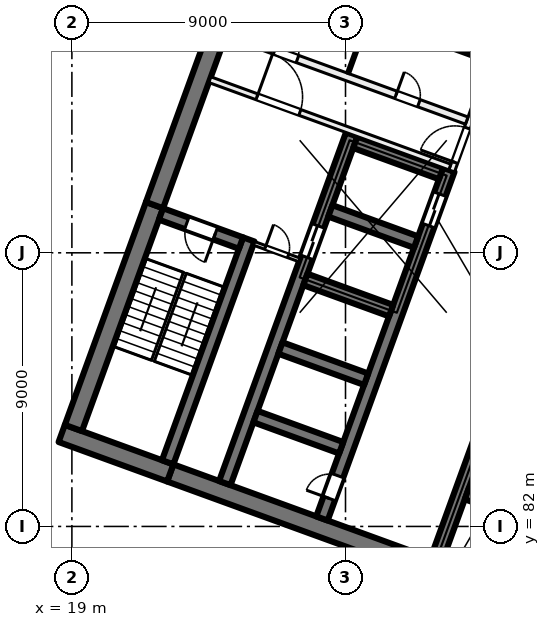
"""IFC4 building model, lengths in metres.
Left out: names, types, materials, properties, quantities, classifications, styles, units other than length and angle.
Written with IfcOpenShell. Run it as: python <this file> out.ifc"""

import sys

from ifc_helpers import new_model, si_unit, direction, frame, frame_2d, origin, place, context, subcontext, project, spatial, rectangle, extrude, element, fill, save


model = new_model("IFC4")
c1 = context("Model", 3, precision=1e-05, world=origin(), true_north=direction((0.0, 1.0)))
c2 = subcontext(c1, "Body", "Model", "MODEL_VIEW")
j1 = project(units=[si_unit("LENGTHUNIT", "METRE"), si_unit("PLANEANGLEUNIT", "RADIAN")], contexts=[c1])
p1 = place(None, origin())
s1 = spatial("IfcSite", under=j1, at=p1, CompositionType="ELEMENT")
p2 = place(p1, origin())
s2 = spatial("IfcBuilding", under=s1, at=p2, CompositionType="ELEMENT")
p3 = place(p2, frame((0.0, 0.0, 39.5)))
s3 = spatial("IfcBuildingStorey", under=s2, at=p3, CompositionType="ELEMENT", Elevation=39.5)
p4 = place(p3, frame((35.767, 78.835, 0.0), z_axis=(0.0, 0.0, 1.0), x_axis=(-0.939692894512, 0.342019391267, 0.0)))
e1 = element("IfcWall", 1, at=p4, inside=s3, PredefinedType="SHEAR", context=c2, shape_type="SweptSolid", body=[
    extrude(rectangle(XDim=14.4, YDim=0.6, at=frame_2d((7.2, 0.0))), origin(), (0.0, 0.0, 1.0), 4.0),
])
p5 = place(p3, frame((22.236, 83.76, 0.0), z_axis=(0.0, 0.0, 1.0), x_axis=(-0.939680822529, 0.342052557032, 0.0)))
e2 = element("IfcWall", 2, at=p5, inside=s3, PredefinedType="SHEAR", context=c2, shape_type="SweptSolid", body=[
    extrude(rectangle(XDim=3.8, YDim=0.6, at=frame_2d((1.9, 0.0))), origin(), (0.0, 0.0, 1.0), 4.0),
])
p6 = place(p3, frame((19.05, 85.239, 0.0), z_axis=(0.0, 0.0, 1.0), x_axis=(0.342016982193, 0.939693771338, 0.0)))
e3 = element("IfcWall", 3, at=p6, inside=s3, PredefinedType="SHEAR", context=c2, shape_type="SweptSolid", body=[
    extrude(rectangle(XDim=7.8, YDim=0.6, at=frame_2d((3.9, 0.0))), origin(), (0.0, 0.0, 1.0), 4.0),
])
p7 = place(p3, frame((21.717, 92.568, 0.0), z_axis=(0.0, 0.0, 1.0), x_axis=(0.342016162452, 0.939694069696, 0.0)))
e4 = element("IfcWall", 4, at=p7, inside=s3, PredefinedType="SHEAR", context=c2, shape_type="SweptSolid", body=[
    extrude(rectangle(XDim=8.9, YDim=0.6, at=frame_2d((4.45, 0.0))), origin(), (0.0, 0.0, 1.0), 4.0),
])
p8 = place(p3, frame((22.15, 84.11, 0.0), z_axis=(0.0, 0.0, 1.0), x_axis=(0.342016982193, 0.939693771338, 0.0)))
e5 = element("IfcWall", 5, at=p8, inside=s3, PredefinedType="SHEAR", context=c2, shape_type="SweptSolid", body=[
    extrude(rectangle(XDim=7.8, YDim=0.4, at=frame_2d((3.9, 0.0))), origin(), (0.0, 0.0, 1.0), 4.0),
])
p9 = place(p3, frame((24.562, 91.32, 0.0), z_axis=(0.0, 0.0, 1.0), x_axis=(-0.939717030584, 0.341953070509, 0.0)))
e6 = element("IfcWall", 6, at=p9, inside=s3, PredefinedType="SHEAR", context=c2, shape_type="SweptSolid", body=[
    extrude(rectangle(XDim=2.8, YDim=0.4, at=frame_2d((1.4, 0.0))), origin(), (0.0, 0.0, 1.0), 4.0),
])
p10 = place(p9, frame((0.9, 0.0, 0.0)))
e7 = element("IfcOpeningElement", 7, at=p10, cuts=e6, PredefinedType="OPENING", context=c2, shape_type="SweptSolid", body=[
    extrude(rectangle(XDim=1.0, YDim=2.1, at=frame_2d((0.5, 1.05))), frame((0.0, 0.21, 0.0), z_axis=(0.0, -1.0, 0.0), x_axis=(1.0, 0.0, 0.0)), (0.0, 0.0, 1.0), 0.42),
])
p11 = place(p3, frame((30.984, 80.895, 0.0), z_axis=(0.0, 0.0, 1.0), x_axis=(0.342021021735, 0.939692301071, 0.0)))
e8 = element("IfcWall", 8, at=p11, inside=s3, PredefinedType="SHEAR", context=c2, shape_type="SweptSolid", body=[
    extrude(rectangle(XDim=12.2, YDim=0.4, at=frame_2d((6.1, 0.0))), origin(), (0.0, 0.0, 1.0), 4.0),
])
p12 = place(p11, frame((5.45, 0.0, 0.0)))
e9 = element("IfcOpeningElement", 9, at=p12, cuts=e8, PredefinedType="OPENING", context=c2, shape_type="SweptSolid", body=[
    extrude(rectangle(XDim=1.1, YDim=2.1, at=frame_2d((0.55, 1.05))), frame((0.0, 0.21, 0.0), z_axis=(0.0, -1.0, 0.0), x_axis=(1.0, 0.0, 0.0)), (0.0, 0.0, 1.0), 0.42),
])
p13 = place(p11, frame((7.85, 0.0, 0.0)))
e10 = element("IfcOpeningElement", 10, at=p13, cuts=e8, PredefinedType="OPENING", context=c2, shape_type="SweptSolid", body=[
    extrude(rectangle(XDim=1.1, YDim=2.1, at=frame_2d((0.55, 1.05))), frame((0.0, 0.21, 0.0), z_axis=(0.0, -1.0, 0.0), x_axis=(1.0, 0.0, 0.0)), (0.0, 0.0, 1.0), 0.42),
])
p14 = place(p11, frame((10.25, 0.0, 0.0)))
e11 = element("IfcOpeningElement", 11, at=p14, cuts=e8, PredefinedType="OPENING", context=c2, shape_type="SweptSolid", body=[
    extrude(rectangle(XDim=1.1, YDim=2.1, at=frame_2d((0.55, 1.05))), frame((0.0, 0.21, 0.0), z_axis=(0.0, -1.0, 0.0), x_axis=(1.0, 0.0, 0.0)), (0.0, 0.0, 1.0), 0.42),
])
p15 = place(p3, frame((34.812, 82.056, 0.0), z_axis=(0.0, 0.0, 1.0), x_axis=(-0.939686455819, 0.342037080957, 0.0)))
e12 = element("IfcWall", 12, at=p15, inside=s3, PredefinedType="SHEAR", context=c2, shape_type="SweptSolid", body=[
    extrude(rectangle(XDim=3.0, YDim=0.4, at=frame_2d((1.5, 0.0))), origin(), (0.0, 0.0, 1.0), 4.0),
])
p16 = place(p3, frame((27.225, 82.263, 0.0), z_axis=(0.0, 0.0, 1.0), x_axis=(0.342014590177, 0.939694641948, 0.0)))
e13 = element("IfcWall", 13, at=p16, inside=s3, PredefinedType="SHEAR", context=c2, shape_type="SweptSolid", body=[
    extrude(rectangle(XDim=12.2, YDim=0.4, at=frame_2d((6.1, 0.0))), origin(), (0.0, 0.0, 1.0), 4.0),
])
p17 = place(p16, frame((10.25, 0.0, 0.0)))
e14 = element("IfcOpeningElement", 14, at=p17, cuts=e13, PredefinedType="OPENING", context=c2, shape_type="SweptSolid", body=[
    extrude(rectangle(XDim=1.1, YDim=2.1, at=frame_2d((0.55, 1.05))), frame((0.0, 0.21, 0.0), z_axis=(0.0, -1.0, 0.0), x_axis=(1.0, 0.0, 0.0)), (0.0, 0.0, 1.0), 0.42),
])
p18 = place(p16, frame((0.7, 0.0, 0.0)))
e15 = element("IfcOpeningElement", 15, at=p18, cuts=e13, PredefinedType="OPENING", context=c2, shape_type="SweptSolid", body=[
    extrude(rectangle(XDim=0.8, YDim=2.1, at=frame_2d((0.4, 1.05))), frame((0.0, 0.21, 0.0), z_axis=(0.0, -1.0, 0.0), x_axis=(1.0, 0.0, 0.0)), (0.0, 0.0, 1.0), 0.42),
])
p19 = place(p3, frame((24.03, 83.426, 0.0), z_axis=(0.0, 0.0, 1.0), x_axis=(0.342014590177, 0.939694641948, 0.0)))
e16 = element("IfcWall", 16, at=p19, inside=s3, PredefinedType="SHEAR", context=c2, shape_type="SweptSolid", body=[
    extrude(rectangle(XDim=12.2, YDim=0.4, at=frame_2d((6.1, 0.0))), origin(), (0.0, 0.0, 1.0), 4.0),
])
p20 = place(p19, frame((7.9, 0.0, 0.0)))
e17 = element("IfcOpeningElement", 17, at=p20, cuts=e16, PredefinedType="OPENING", context=c2, shape_type="SweptSolid", body=[
    extrude(rectangle(XDim=1.1, YDim=2.1, at=frame_2d((0.55, 1.05))), frame((0.0, 0.21, 0.0), z_axis=(0.0, -1.0, 0.0), x_axis=(1.0, 0.0, 0.0)), (0.0, 0.0, 1.0), 0.42),
])
p21 = place(p3, frame((27.858, 84.587, 0.0), z_axis=(0.0, 0.0, 1.0), x_axis=(-0.939686455819, 0.342037080957, 0.0)))
e18 = element("IfcWall", 18, at=p21, inside=s3, PredefinedType="SHEAR", context=c2, shape_type="SweptSolid", body=[
    extrude(rectangle(XDim=3.0, YDim=0.4, at=frame_2d((1.5, 0.0))), origin(), (0.0, 0.0, 1.0), 4.0),
])
p22 = place(p3, frame((28.678, 86.842, 0.0), z_axis=(0.0, 0.0, 1.0), x_axis=(-0.939676934218, 0.342063238742, 0.0)))
e19 = element("IfcWall", 19, at=p22, inside=s3, PredefinedType="SHEAR", context=c2, shape_type="SweptSolid", body=[
    extrude(rectangle(XDim=3.0, YDim=0.4, at=frame_2d((1.5, 0.0))), origin(), (0.0, 0.0, 1.0), 4.0),
])
for number, where, z_axis, x_axis in (
    (20, (29.5, 89.097, 0.0), (0.0, 0.0, 1.0), (-0.94, 0.342, 0.0)),
    (21, (30.32, 91.353, 0.0), (0.0, 0.0, 1.0), (-0.94, 0.342, 0.0)),
    (22, (31.141, 93.608, 0.0), (0.0, 0.0, 1.0), (-0.94, 0.342, 0.0)),
):
    element("IfcWall", number, at=place(p3, frame(where, z_axis=z_axis, x_axis=x_axis)), inside=s3, PredefinedType="SHEAR", context=c2, shape_type="SweptSolid", body=[
        extrude(rectangle(XDim=3.0, YDim=0.4, at=frame_2d((1.5, 0.0))), origin(), (0.0, 0.0, 1.0), 4.0),
    ])
p23 = place(p3, frame((32.953, 97.418, 0.0), z_axis=(0.0, 0.0, 1.0), x_axis=(-0.93969060187, 0.342025690201, 0.0)))
e23 = element("IfcWall", 23, at=p23, inside=s3, PredefinedType="SHEAR", context=c2, shape_type="SweptSolid", body=[
    extrude(rectangle(XDim=8.6, YDim=0.4, at=frame_2d((4.3, 0.0))), origin(), (0.0, 0.0, 1.0), 4.0),
])
p24 = place(p3, frame((31.491, 93.693, 0.0), z_axis=(0.0, 0.0, 1.0), x_axis=(0.341995824804, 0.939701471648, 0.0)))
e24 = element("IfcWall", 24, at=p24, inside=s3, PredefinedType="PARTITIONING", context=c2, shape_type="SweptSolid", body=[
    extrude(rectangle(XDim=3.8, YDim=0.2, at=frame_2d((1.9, 0.0))), origin(), (0.0, 0.0, 1.0), 3.625),
])
p25 = place(p24, frame((0.3, 0.0, 0.0)))
e25 = element("IfcOpeningElement", 25, at=p25, cuts=e24, PredefinedType="OPENING", context=c2, shape_type="SweptSolid", body=[
    extrude(rectangle(XDim=1.2, YDim=2.1, at=frame_2d((0.6, 1.05))), frame((0.0, 0.11, 0.0), z_axis=(0.0, -1.0, 0.0), x_axis=(1.0, 0.0, 0.0)), (0.0, 0.0, 1.0), 0.22),
])
p26 = place(p3, frame((23.538, 96.694, 0.0), z_axis=(0.0, 0.0, 1.0), x_axis=(0.939691552312, -0.342023078919, 0.0)))
e26 = element("IfcWall", 26, at=p26, inside=s3, PredefinedType="PARTITIONING", context=c2, shape_type="SweptSolid", body=[
    extrude(rectangle(XDim=8.4, YDim=0.2, at=frame_2d((4.2, 0.0))), origin(), (0.0, 0.0, 1.0), 3.625),
])
p27 = place(p26, frame((1.65, 0.0, 0.0)))
e27 = element("IfcOpeningElement", 27, at=p27, cuts=e26, PredefinedType="OPENING", context=c2, shape_type="SweptSolid", body=[
    extrude(rectangle(XDim=1.5, YDim=2.1, at=frame_2d((0.75, 1.05))), frame((0.0, 0.11, 0.0), z_axis=(0.0, -1.0, 0.0), x_axis=(1.0, 0.0, 0.0)), (0.0, 0.0, 1.0), 0.22),
])
p28 = place(p3, frame((24.094, 98.221, 0.0), z_axis=(0.0, 0.0, 1.0), x_axis=(0.939691552312, -0.342023078919, 0.0)))
e28 = element("IfcWall", 28, at=p28, inside=s3, PredefinedType="PARTITIONING", context=c2, shape_type="SweptSolid", body=[
    extrude(rectangle(XDim=8.4, YDim=0.25, at=frame_2d((4.2, 0.0))), origin(), (0.0, 0.0, 1.0), 3.625),
])
p29 = place(p28, frame((5.925, 0.0, 0.0)))
e29 = element("IfcOpeningElement", 29, at=p29, cuts=e28, PredefinedType="OPENING", context=c2, shape_type="SweptSolid", body=[
    extrude(rectangle(XDim=0.8, YDim=2.1, at=frame_2d((0.4, 1.05))), frame((0.0, 0.135, 0.0), z_axis=(0.0, -1.0, 0.0), x_axis=(1.0, 0.0, 0.0)), (0.0, 0.0, 1.0), 0.27),
])
p30 = place(p28, frame((1.675, 0.0, 0.0)))
e30 = element("IfcOpeningElement", 30, at=p30, cuts=e28, PredefinedType="OPENING", context=c2, shape_type="SweptSolid", body=[
    extrude(rectangle(XDim=0.8, YDim=2.1, at=frame_2d((0.4, 1.05))), frame((0.0, 0.135, 0.0), z_axis=(0.0, -1.0, 0.0), x_axis=(1.0, 0.0, 0.0)), (0.0, 0.0, 1.0), 0.27),
])
p31 = place(p3, frame((24.985, 91.312, 0.0), z_axis=(0.0, 0.0, 1.0), x_axis=(0.939708740826, -0.341975850632, 0.0)))
e31 = element("IfcWall", 31, at=p31, inside=s3, PredefinedType="PARTITIONING", context=c2, shape_type="SweptSolid", body=[
    extrude(rectangle(XDim=1.6, YDim=0.125, at=frame_2d((0.8, 0.0))), origin(), (0.0, 0.0, 1.0), 3.625),
])
p32 = place(p31, frame((0.4, 0.0, 0.0)))
e32 = element("IfcOpeningElement", 32, at=p32, cuts=e31, PredefinedType="OPENING", context=c2, shape_type="SweptSolid", body=[
    extrude(rectangle(XDim=0.8, YDim=2.1, at=frame_2d((0.4, 1.05))), frame((0.0, 0.073, 0.0), z_axis=(0.0, -1.0, 0.0), x_axis=(1.0, 0.0, 0.0)), (0.0, 0.0, 1.0), 0.145),
])
p33 = place(p3, frame((28.083, 96.902, 0.0), z_axis=(0.0, 0.0, 1.0), x_axis=(0.342024501273, 0.939691034611, 0.0)))
e33 = element("IfcWall", 33, at=p33, inside=s3, PredefinedType="PARTITIONING", context=c2, shape_type="SweptSolid", body=[
    extrude(rectangle(XDim=1.95, YDim=0.1, at=frame_2d((0.975, 0.0))), origin(), (0.0, 0.0, 1.0), 3.625),
])
p34 = place(p17, origin())
e34 = element("IfcDoor", 34, at=p34, inside=s3, OperationType="DOUBLE_DOOR_SLIDING", PredefinedType="DOOR", context=c2, shape_type="SweptSolid", body=[
    extrude(rectangle(XDim=1.1, YDim=2.1, at=frame_2d((0.55, 1.05))), frame((0.0, 0.025, 0.0), z_axis=(0.0, -1.0, 0.0), x_axis=(1.0, 0.0, 0.0)), (0.0, 0.0, 1.0), 0.05),
])
fill(e14, e34)
p35 = place(p18, origin())
e35 = element("IfcDoor", 35, at=p35, inside=s3, OperationType="SINGLE_SWING_LEFT", PredefinedType="DOOR", context=c2, shape_type="SweptSolid", body=[
    extrude(rectangle(XDim=0.8, YDim=2.1, at=frame_2d((0.4, 1.05))), frame((0.0, 0.025, 0.0), z_axis=(0.0, -1.0, 0.0), x_axis=(1.0, 0.0, 0.0)), (0.0, 0.0, 1.0), 0.05),
])
fill(e15, e35)
p36 = place(p25, origin())
e36 = element("IfcDoor", 36, at=p36, inside=s3, OperationType="DOUBLE_DOOR_SINGLE_SWING", PredefinedType="DOOR", context=c2, shape_type="SweptSolid", body=[
    extrude(rectangle(XDim=1.2, YDim=2.1, at=frame_2d((0.6, 1.05))), frame((0.0, 0.025, 0.0), z_axis=(0.0, -1.0, 0.0), x_axis=(1.0, 0.0, 0.0)), (0.0, 0.0, 1.0), 0.05),
])
fill(e25, e36)
p37 = place(p27, origin())
e37 = element("IfcDoor", 37, at=p37, inside=s3, OperationType="DOUBLE_DOOR_SINGLE_SWING", PredefinedType="DOOR", context=c2, shape_type="SweptSolid", body=[
    extrude(rectangle(XDim=1.5, YDim=2.1, at=frame_2d((0.75, 1.05))), frame((0.0, 0.025, 0.0), z_axis=(0.0, -1.0, 0.0), x_axis=(1.0, 0.0, 0.0)), (0.0, 0.0, 1.0), 0.05),
])
fill(e27, e37)
p38 = place(p10, origin())
e38 = element("IfcDoor", 38, at=p38, inside=s3, OperationType="SINGLE_SWING_LEFT", PredefinedType="DOOR", context=c2, shape_type="SweptSolid", body=[
    extrude(rectangle(XDim=1.0, YDim=2.1, at=frame_2d((0.5, 1.05))), frame((0.0, 0.025, 0.0), z_axis=(0.0, -1.0, 0.0), x_axis=(1.0, 0.0, 0.0)), (0.0, 0.0, 1.0), 0.05),
])
fill(e7, e38)
p39 = place(p32, origin())
e39 = element("IfcDoor", 39, at=p39, inside=s3, OperationType="SINGLE_SWING_RIGHT", PredefinedType="DOOR", context=c2, shape_type="SweptSolid", body=[
    extrude(rectangle(XDim=0.8, YDim=2.1, at=frame_2d((0.4, 1.05))), frame((0.0, 0.025, 0.0), z_axis=(0.0, -1.0, 0.0), x_axis=(1.0, 0.0, 0.0)), (0.0, 0.0, 1.0), 0.05),
])
fill(e32, e39)
p40 = place(p29, origin())
e40 = element("IfcDoor", 40, at=p40, inside=s3, OperationType="SINGLE_SWING_LEFT", PredefinedType="DOOR", context=c2, shape_type="SweptSolid", body=[
    extrude(rectangle(XDim=0.8, YDim=2.1, at=frame_2d((0.4, 1.05))), frame((0.0, 0.025, 0.0), z_axis=(0.0, -1.0, 0.0), x_axis=(1.0, 0.0, 0.0)), (0.0, 0.0, 1.0), 0.05),
])
fill(e29, e40)
p41 = place(p30, origin())
e41 = element("IfcDoor", 41, at=p41, inside=s3, OperationType="SINGLE_SWING_RIGHT", PredefinedType="DOOR", context=c2, shape_type="SweptSolid", body=[
    extrude(rectangle(XDim=0.8, YDim=2.1, at=frame_2d((0.4, 1.05))), frame((0.0, 0.025, 0.0), z_axis=(0.0, -1.0, 0.0), x_axis=(1.0, 0.0, 0.0)), (0.0, 0.0, 1.0), 0.05),
])
fill(e30, e41)
p42 = place(p20, origin())
e42 = element("IfcDoor", 42, at=p42, inside=s3, OperationType="DOUBLE_DOOR_SLIDING", PredefinedType="DOOR", context=c2, shape_type="SweptSolid", body=[
    extrude(rectangle(XDim=1.1, YDim=2.1, at=frame_2d((0.55, 1.05))), frame((0.0, 0.025, 0.0), z_axis=(0.0, -1.0, 0.0), x_axis=(1.0, 0.0, 0.0)), (0.0, 0.0, 1.0), 0.05),
])
fill(e17, e42)
save(model, sys.argv[1])
